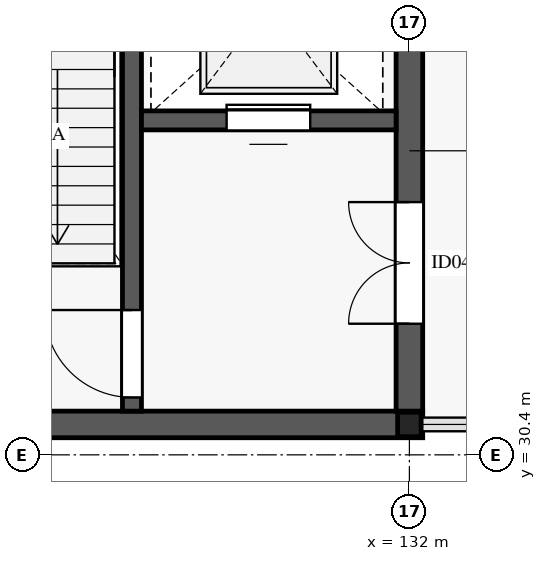
"""IFC4 building model, lengths in metres.
Left out: names, types, materials, properties, quantities, classifications, styles, units other than length and angle.
Written with IfcOpenShell. Run it as: python <this file> out.ifc"""

import sys

from ifc_helpers import new_model, si_unit, direction, frame, frame_2d, origin, origin_2d, place, context, subcontext, project, spatial, rectangle, i_section, extrude, element, fill, save


model = new_model("IFC4")
c1 = context("Model", 3, precision=1e-05, world=origin(), true_north=direction((0.0, 1.0)))
c2 = subcontext(c1, "Body", "Model", "MODEL_VIEW")
j1 = project(units=[si_unit("LENGTHUNIT", "METRE"), si_unit("PLANEANGLEUNIT", "RADIAN")], contexts=[c1])
p1 = place(None, origin())
s1 = spatial("IfcSite", under=j1, at=p1, CompositionType="ELEMENT")
p2 = place(p1, origin())
s2 = spatial("IfcBuilding", under=s1, at=p2, CompositionType="ELEMENT")
p3 = place(p2, frame((0.0, 0.0, 25.2)))
s3 = spatial("IfcBuildingStorey", under=s2, at=p3, CompositionType="ELEMENT", Elevation=25.2)
p4 = place(p3, frame((132.0, 30.8, 0.0), z_axis=(0.0, 0.0, 1.0), x_axis=(1.0, 0.0, 0.0)))
e1 = element("IfcColumn", 1, at=p4, inside=s3, PredefinedType="COLUMN", context=c2, shape_type="SweptSolid", body=[
    extrude(i_section(OverallWidth=0.309, OverallDepth=0.323, WebThickness=0.014, FlangeThickness=0.023, FilletRadius=0.015, at=origin_2d()), origin(), (0.0, 0.0, 1.0), 3.995),
])
p5 = place(p3, frame((124.225, 30.8, 0.0), z_axis=(0.0, 0.0, 1.0), x_axis=(1.0, 0.0, 0.0)))
e2 = element("IfcWall", 2, at=p5, inside=s3, PredefinedType="SHEAR", context=c2, shape_type="SweptSolid", body=[
    extrude(rectangle(XDim=7.95, YDim=0.35, at=frame_2d((3.975, 0.0))), origin(), (0.0, 0.0, 1.0), 3.99),
])
p6 = place(p3, frame((132.0, 30.975, 0.0), z_axis=(0.0, 0.0, 1.0), x_axis=(0.0, 1.0, 0.0)))
e3 = element("IfcWall", 3, at=p6, inside=s3, PredefinedType="SHEAR", context=c2, shape_type="SweptSolid", body=[
    extrude(rectangle(XDim=6.85, YDim=0.35, at=frame_2d((3.425, 0.0))), origin(), (0.0, 0.0, 1.0), 3.99),
])
p7 = place(p6, frame((1.15, 0.0, 0.0)))
e4 = element("IfcOpeningElement", 4, at=p7, cuts=e3, PredefinedType="OPENING", context=c2, shape_type="SweptSolid", body=[
    extrude(rectangle(XDim=1.6, YDim=2.35, at=frame_2d((0.8, 1.175))), frame((0.0, 0.185, 0.0), z_axis=(0.0, -1.0, 0.0), x_axis=(1.0, 0.0, 0.0)), (0.0, 0.0, 1.0), 0.37),
])
p8 = place(p3, frame((128.35, 30.975, 0.0), z_axis=(0.0, 0.0, 1.0), x_axis=(0.0, 1.0, 0.0)))
e5 = element("IfcWall", 5, at=p8, inside=s3, PredefinedType="SHEAR", context=c2, shape_type="SweptSolid", body=[
    extrude(rectangle(XDim=6.85, YDim=0.25, at=frame_2d((3.425, 0.0))), origin(), (0.0, 0.0, 1.0), 3.99),
])
p9 = place(p8, frame((0.18, 0.0, 0.0)))
e6 = element("IfcOpeningElement", 6, at=p9, cuts=e5, PredefinedType="OPENING", context=c2, shape_type="SweptSolid", body=[
    extrude(rectangle(XDim=1.15, YDim=2.2, at=frame_2d((0.575, 1.1))), frame((0.0, 0.135, 0.0), z_axis=(0.0, -1.0, 0.0), x_axis=(1.0, 0.0, 0.0)), (0.0, 0.0, 1.0), 0.27),
])
p10 = place(p3, frame((128.475, 34.8, 0.0), z_axis=(0.0, 0.0, 1.0), x_axis=(1.0, 0.0, 0.0)))
e7 = element("IfcWall", 7, at=p10, inside=s3, PredefinedType="SHEAR", context=c2, shape_type="SweptSolid", body=[
    extrude(rectangle(XDim=3.35, YDim=0.25, at=frame_2d((1.675, 0.0))), origin(), (0.0, 0.0, 1.0), 3.99),
])
p11 = place(p10, frame((1.12, 0.0, 0.0)))
e8 = element("IfcOpeningElement", 8, at=p11, cuts=e7, PredefinedType="OPENING", context=c2, shape_type="SweptSolid", body=[
    extrude(rectangle(XDim=1.1, YDim=2.2, at=frame_2d((0.55, 1.1))), frame((0.0, 0.135, 0.0), z_axis=(0.0, -1.0, 0.0), x_axis=(1.0, 0.0, 0.0)), (0.0, 0.0, 1.0), 0.27),
])
p12 = place(p9, origin())
e9 = element("IfcDoor", 9, at=p12, inside=s3, OperationType="SINGLE_SWING_RIGHT", PredefinedType="DOOR", context=c2, shape_type="SweptSolid", body=[
    extrude(rectangle(XDim=1.15, YDim=2.2, at=frame_2d((0.575, 1.1))), frame((0.0, 0.025, 0.0), z_axis=(0.0, -1.0, 0.0), x_axis=(1.0, 0.0, 0.0)), (0.0, 0.0, 1.0), 0.05),
])
fill(e6, e9)
p13 = place(p7, origin())
e10 = element("IfcDoor", 10, at=p13, inside=s3, OperationType="DOUBLE_DOOR_SINGLE_SWING", PredefinedType="DOOR", context=c2, shape_type="SweptSolid", body=[
    extrude(rectangle(XDim=1.6, YDim=2.35, at=frame_2d((0.8, 1.175))), frame((0.0, 0.025, 0.0), z_axis=(0.0, -1.0, 0.0), x_axis=(1.0, 0.0, 0.0)), (0.0, 0.0, 1.0), 0.05),
])
fill(e4, e10)
p14 = place(p11, origin())
e11 = element("IfcDoor", 11, at=p14, inside=s3, OperationType="SLIDING_TO_LEFT", PredefinedType="DOOR", context=c2, shape_type="SweptSolid", body=[
    extrude(rectangle(XDim=1.1, YDim=2.2, at=frame_2d((0.55, 1.1))), frame((0.0, 0.025, 0.0), z_axis=(0.0, -1.0, 0.0), x_axis=(1.0, 0.0, 0.0)), (0.0, 0.0, 1.0), 0.05),
])
fill(e8, e11)
save(model, sys.argv[1])
